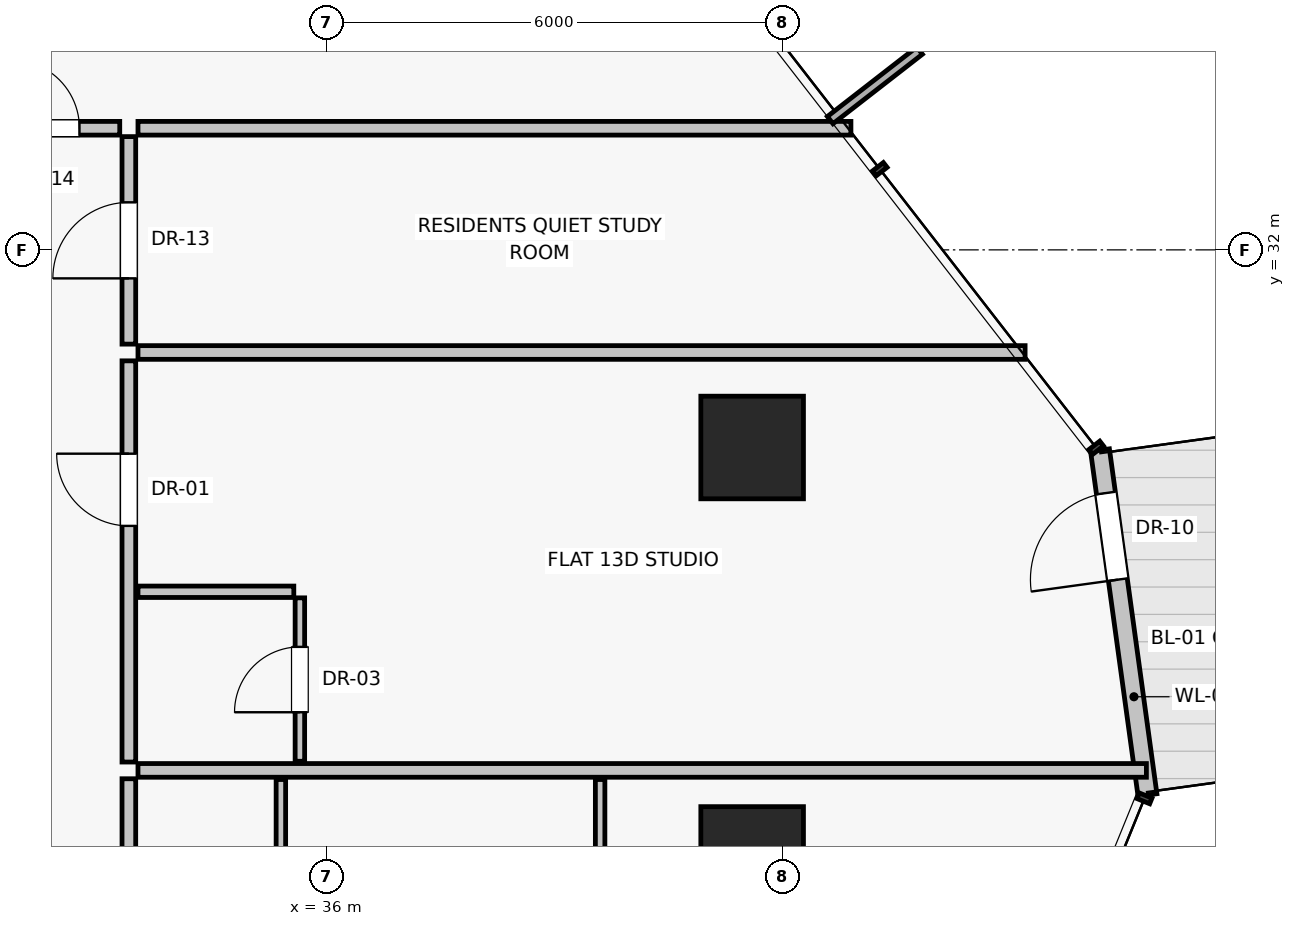
"""IFC4 building model, lengths in metres.
Left out: names, types, materials, properties, quantities, classifications, styles, units other than length and angle.
Written with IfcOpenShell. Run it as: python <this file> out.ifc"""

import sys

from ifc_helpers import new_model, si_unit, direction, frame, frame_2d, origin, origin_2d, place, context, subcontext, project, spatial, rectangle, extrude, source, transform, mapped, element, fill, save


model = new_model("IFC4")
c1 = context("Model", 3, precision=1e-05, world=origin(), true_north=direction((0.0, 1.0)))
c2 = subcontext(c1, "Body", "Model", "MODEL_VIEW")
j1 = project(units=[si_unit("LENGTHUNIT", "METRE"), si_unit("PLANEANGLEUNIT", "RADIAN")], contexts=[c1])
p1 = place(None, origin())
s1 = spatial("IfcSite", under=j1, at=p1, CompositionType="ELEMENT")
p2 = place(p1, origin())
s2 = spatial("IfcBuilding", under=s1, at=p2, CompositionType="ELEMENT")
p3 = place(p2, frame((0.0, 0.0, 50.05)))
s3 = spatial("IfcBuildingStorey", under=s2, at=p3, CompositionType="ELEMENT", Elevation=50.05)
for number, where, z_axis, x_axis in (
    (1, (41.6, 24.0, 0.0), (0.0, 0.0, 1.0), (1.0, 0.0, 0.0)),
    (2, (41.6, 29.4, 0.0), (0.0, 0.0, 1.0), (1.0, 0.0, 0.0)),
):
    element("IfcColumn", number, at=place(p3, frame(where, z_axis=z_axis, x_axis=x_axis)), inside=s3, PredefinedType="COLUMN", context=c2, shape_type="SweptSolid", body=[
        extrude(rectangle(XDim=1.35, YDim=1.35, at=origin_2d()), origin(), (0.0, 0.0, 1.0), 3.25),
    ])
p4 = place(p3, frame((46.801, 24.828, 0.0), z_axis=(0.0, 0.0, 1.0), x_axis=(-0.136411912987, 0.990652204356, 0.0)))
e3 = element("IfcWall", 3, at=p4, inside=s3, PredefinedType="SOLIDWALL", context=c2, shape_type="SweptSolid", body=[
    extrude(rectangle(XDim=4.58, YDim=0.25, at=frame_2d((2.29, 0.0))), origin(), (0.0, 0.0, 1.0), 3.0),
])
p5 = place(p4, frame((2.86, 0.0, 0.0)))
e4 = element("IfcOpeningElement", 4, at=p5, cuts=e3, PredefinedType="OPENING", context=c2, shape_type="SweptSolid", body=[
    extrude(rectangle(XDim=1.15, YDim=2.25, at=frame_2d((0.575, 1.125))), frame((0.0, 0.135, 0.0), z_axis=(0.0, -1.0, 0.0), x_axis=(1.0, 0.0, 0.0)), (0.0, 0.0, 1.0), 0.27),
])
p6 = place(p3, frame((33.52, 33.6, 0.0), z_axis=(0.0, 0.0, 1.0), x_axis=(1.0, 0.0, 0.0)))
e5 = element("IfcWall", 5, at=p6, inside=s3, PredefinedType="PARTITIONING", context=c2, shape_type="SweptSolid", body=[
    extrude(rectangle(XDim=9.379, YDim=0.18, at=frame_2d((4.69, 0.0))), origin(), (0.0, 0.0, 1.0), 3.0),
])
p7 = place(p3, frame((33.4, 14.31, 0.0), z_axis=(0.0, 0.0, 1.0), x_axis=(0.0, 1.0, 0.0)))
e6 = element("IfcWall", 6, at=p7, inside=s3, PredefinedType="PARTITIONING", context=c2, shape_type="SweptSolid", body=[
    extrude(rectangle(XDim=10.732, YDim=0.18, at=frame_2d((5.366, 0.0))), origin(), (0.0, 0.0, 1.0), 3.0),
])
p8 = place(p7, frame((3.552, 0.0, 0.0)))
e7 = element("IfcOpeningElement", 7, at=p8, cuts=e6, PredefinedType="OPENING", context=c2, shape_type="SweptSolid", body=[
    extrude(rectangle(XDim=0.95, YDim=2.02, at=frame_2d((0.475, 1.01))), frame((0.0, 0.1, 0.0), z_axis=(0.0, -1.0, 0.0), x_axis=(1.0, 0.0, 0.0)), (0.0, 0.0, 1.0), 0.2),
])
for number, where, z_axis, x_axis in (
    (8, (35.4, 20.324, 0.0), (0.0, 0.0, 1.0), (0.0, 1.0, 0.0)),
    (9, (39.6, 20.324, 0.0), (0.0, 0.0, 1.0), (0.0, 1.0, 0.0)),
):
    element("IfcWall", number, at=place(p3, frame(where, z_axis=z_axis, x_axis=x_axis)), inside=s3, PredefinedType="PARTITIONING", context=c2, shape_type="SweptSolid", body=[
        extrude(rectangle(XDim=4.708, YDim=0.125, at=frame_2d((2.354, 0.0))), origin(), (0.0, 0.0, 1.0), 3.0),
    ])
p9 = place(p3, frame((33.52, 25.152, 0.0), z_axis=(0.0, 0.0, 1.0), x_axis=(1.0, 0.0, 0.0)))
e10 = element("IfcWall", 10, at=p9, inside=s3, PredefinedType="PARTITIONING", context=c2, shape_type="SweptSolid", body=[
    extrude(rectangle(XDim=13.267, YDim=0.18, at=frame_2d((6.633, 0.0))), origin(), (0.0, 0.0, 1.0), 3.0),
])
p10 = place(p3, frame((33.4, 30.76, 0.0), z_axis=(0.0, 0.0, 1.0), x_axis=(0.0, 1.0, 0.0)))
e11 = element("IfcWall", 11, at=p10, inside=s3, PredefinedType="PARTITIONING", context=c2, shape_type="SweptSolid", body=[
    extrude(rectangle(XDim=2.73, YDim=0.18, at=frame_2d((1.365, 0.0))), origin(), (0.0, 0.0, 1.0), 3.0),
])
p11 = place(p10, frame((0.865, 0.0, 0.0)))
e12 = element("IfcOpeningElement", 12, at=p11, cuts=e11, PredefinedType="OPENING", context=c2, shape_type="SweptSolid", body=[
    extrude(rectangle(XDim=1.0, YDim=2.01, at=frame_2d((0.5, 1.005))), frame((0.0, 0.1, 0.0), z_axis=(0.0, -1.0, 0.0), x_axis=(1.0, 0.0, 0.0)), (0.0, 0.0, 1.0), 0.2),
])
p12 = place(p3, frame((33.52, 30.65, 0.0), z_axis=(0.0, 0.0, 1.0), x_axis=(1.0, 0.0, 0.0)))
e13 = element("IfcWall", 13, at=p12, inside=s3, PredefinedType="PARTITIONING", context=c2, shape_type="SweptSolid", body=[
    extrude(rectangle(XDim=11.671, YDim=0.18, at=frame_2d((5.835, 0.0))), origin(), (0.0, 0.0, 1.0), 2.299),
])
p13 = place(p3, frame((33.4, 25.262, 0.0), z_axis=(0.0, 0.0, 1.0), x_axis=(0.0, 1.0, 0.0)))
e14 = element("IfcWall", 14, at=p13, inside=s3, PredefinedType="PARTITIONING", context=c2, shape_type="SweptSolid", body=[
    extrude(rectangle(XDim=5.278, YDim=0.18, at=frame_2d((2.639, 0.0))), origin(), (0.0, 0.0, 1.0), 3.0),
])
p14 = place(p13, frame((3.107, 0.0, 0.0)))
e15 = element("IfcOpeningElement", 15, at=p14, cuts=e14, PredefinedType="OPENING", context=c2, shape_type="SweptSolid", body=[
    extrude(rectangle(XDim=0.95, YDim=2.02, at=frame_2d((0.475, 1.01))), frame((0.0, 0.1, 0.0), z_axis=(0.0, -1.0, 0.0), x_axis=(1.0, 0.0, 0.0)), (0.0, 0.0, 1.0), 0.2),
])
p15 = place(p3, frame((33.52, 27.502, 0.0), z_axis=(0.0, 0.0, 1.0), x_axis=(1.0, 0.0, 0.0)))
e16 = element("IfcWall", 16, at=p15, inside=s3, PredefinedType="PARTITIONING", context=c2, shape_type="SweptSolid", body=[
    extrude(rectangle(XDim=2.05, YDim=0.15, at=frame_2d((1.025, 0.0))), origin(), (0.0, 0.0, 1.0), 3.0),
])
p16 = place(p3, frame((35.65, 25.272, 0.0), z_axis=(0.0, 0.0, 1.0), x_axis=(0.0, 1.0, 0.0)))
e17 = element("IfcWall", 17, at=p16, inside=s3, PredefinedType="PARTITIONING", context=c2, shape_type="SweptSolid", body=[
    extrude(rectangle(XDim=2.15, YDim=0.125, at=frame_2d((1.075, 0.0))), origin(), (0.0, 0.0, 1.0), 3.0),
])
p17 = place(p16, frame((0.645, 0.0, 0.0)))
e18 = element("IfcOpeningElement", 18, at=p17, cuts=e17, PredefinedType="OPENING", context=c2, shape_type="SweptSolid", body=[
    extrude(rectangle(XDim=0.86, YDim=2.01, at=frame_2d((0.43, 1.005))), frame((0.0, 0.073, 0.0), z_axis=(0.0, -1.0, 0.0), x_axis=(1.0, 0.0, 0.0)), (0.0, 0.0, 1.0), 0.145),
])
p18 = place(p3, frame((31.32, 33.6, 0.0), z_axis=(0.0, 0.0, 1.0), x_axis=(1.0, 0.0, 0.0)))
e19 = element("IfcWall", 19, at=p18, inside=s3, PredefinedType="PARTITIONING", context=c2, shape_type="SweptSolid", body=[
    extrude(rectangle(XDim=1.96, YDim=0.18, at=frame_2d((0.98, 0.0))), origin(), (0.0, 0.0, 1.0), 3.0),
])
p19 = place(p18, frame((0.53, 0.0, 0.0)))
e20 = element("IfcOpeningElement", 20, at=p19, cuts=e19, PredefinedType="OPENING", context=c2, shape_type="SweptSolid", body=[
    extrude(rectangle(XDim=0.9, YDim=2.01, at=frame_2d((0.45, 1.005))), frame((0.0, 0.1, 0.0), z_axis=(0.0, -1.0, 0.0), x_axis=(1.0, 0.0, 0.0)), (0.0, 0.0, 1.0), 0.2),
])
m1 = source(origin(), c2, "Body", "SweptSolid", [
    extrude(rectangle(XDim=1.15, YDim=2.25, at=frame_2d((0.575, 1.125))), frame((0.0, 0.025, 0.0), z_axis=(0.0, -1.0, 0.0), x_axis=(1.0, 0.0, 0.0)), (0.0, 0.0, 1.0), 0.05),
])
p20 = place(p5, frame((1.15, 0.0, 0.0), z_axis=(0.0, 0.0, 1.0), x_axis=(-1.0, 0.0, 0.0)))
e21 = element("IfcDoor", 21, at=p20, inside=s3, OperationType="SINGLE_SWING_LEFT", PredefinedType="DOOR", context=c2, shape_type="MappedRepresentation", body=[
    mapped(m1, transform((0.0, 0.0, 0.0), scale=1.0)),
])
fill(e4, e21)
m2 = source(origin(), c2, "Body", "SweptSolid", [
    extrude(rectangle(XDim=1.0, YDim=2.01, at=frame_2d((0.5, 1.005))), frame((0.0, 0.025, 0.0), z_axis=(0.0, -1.0, 0.0), x_axis=(1.0, 0.0, 0.0)), (0.0, 0.0, 1.0), 0.05),
])
p21 = place(p11, origin())
e22 = element("IfcDoor", 22, at=p21, inside=s3, OperationType="SINGLE_SWING_LEFT", PredefinedType="DOOR", context=c2, shape_type="MappedRepresentation", body=[
    mapped(m2, transform((0.0, 0.0, 0.0), scale=1.0)),
])
fill(e12, e22)
m3 = source(origin(), c2, "Body", "SweptSolid", [
    extrude(rectangle(XDim=0.95, YDim=2.02, at=frame_2d((0.475, 1.01))), frame((0.0, 0.025, 0.0), z_axis=(0.0, -1.0, 0.0), x_axis=(1.0, 0.0, 0.0)), (0.0, 0.0, 1.0), 0.05),
])
p22 = place(p14, origin())
e23 = element("IfcDoor", 23, at=p22, inside=s3, OperationType="SINGLE_SWING_RIGHT", PredefinedType="DOOR", context=c2, shape_type="MappedRepresentation", body=[
    mapped(m3, transform((0.0, 0.0, 0.0), scale=1.0)),
])
fill(e15, e23)
m4 = source(origin(), c2, "Body", "SweptSolid", [
    extrude(rectangle(XDim=0.86, YDim=2.01, at=frame_2d((0.43, 1.005))), frame((0.0, 0.025, 0.0), z_axis=(0.0, -1.0, 0.0), x_axis=(1.0, 0.0, 0.0)), (0.0, 0.0, 1.0), 0.05),
])
p23 = place(p17, origin())
e24 = element("IfcDoor", 24, at=p23, inside=s3, OperationType="SINGLE_SWING_LEFT", PredefinedType="DOOR", context=c2, shape_type="MappedRepresentation", body=[
    mapped(m4, transform((0.0, 0.0, 0.0), scale=1.0)),
])
fill(e18, e24)
m5 = source(origin(), c2, "Body", "SweptSolid", [
    extrude(rectangle(XDim=0.9, YDim=2.01, at=frame_2d((0.45, 1.005))), frame((0.0, 0.025, 0.0), z_axis=(0.0, -1.0, 0.0), x_axis=(1.0, 0.0, 0.0)), (0.0, 0.0, 1.0), 0.05),
])
p24 = place(p19, origin())
e25 = element("IfcDoor", 25, at=p24, inside=s3, OperationType="SINGLE_SWING_LEFT", PredefinedType="DOOR", context=c2, shape_type="MappedRepresentation", body=[
    mapped(m5, transform((0.0, 0.0, 0.0), scale=1.0)),
])
fill(e20, e25)
save(model, sys.argv[1])
